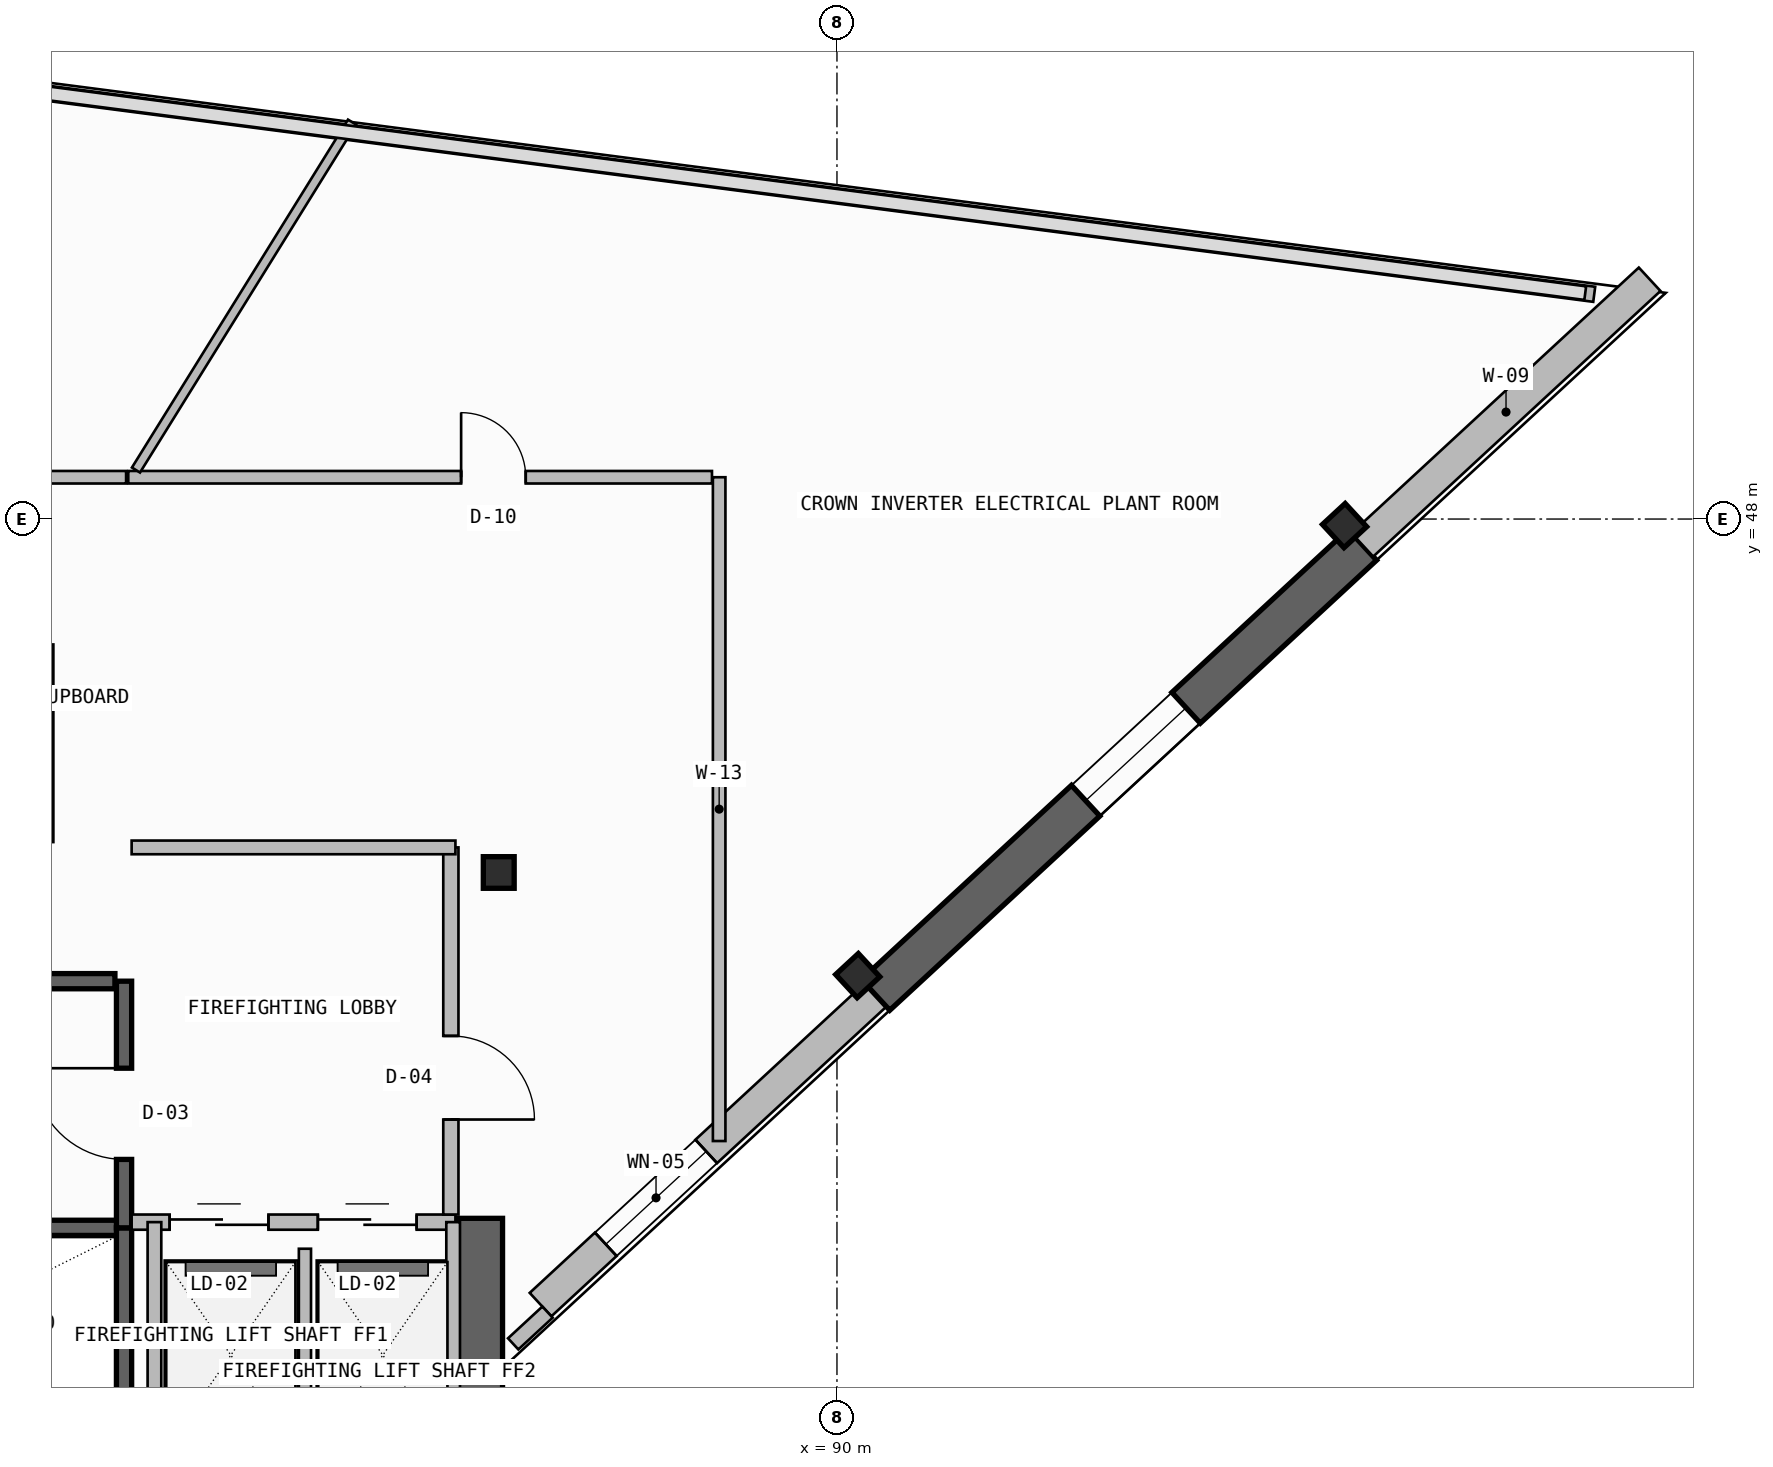
"""IFC4 building model, lengths in metres.
Left out: names, types, materials, properties, quantities, classifications, styles, units other than length and angle.
Written with IfcOpenShell. Run it as: python <this file> out.ifc"""

import sys

from ifc_helpers import new_model, si_unit, direction, frame, frame_2d, origin, origin_2d, place, context, subcontext, project, spatial, polyline, rectangle, i_section, outline, extrude, element, fill, save


model = new_model("IFC4")
c1 = context("Model", 3, precision=1e-05, world=origin(), true_north=direction((0.0, 1.0)))
c2 = subcontext(c1, "Body", "Model", "MODEL_VIEW")
j1 = project(units=[si_unit("LENGTHUNIT", "METRE"), si_unit("PLANEANGLEUNIT", "RADIAN")], contexts=[c1])
p1 = place(None, origin())
s1 = spatial("IfcSite", under=j1, at=p1, CompositionType="ELEMENT")
p2 = place(p1, origin())
s2 = spatial("IfcBuilding", under=s1, at=p2, CompositionType="ELEMENT")
p3 = place(p2, frame((0.0, 0.0, 312.58)))
s3 = spatial("IfcBuildingStorey", under=s2, at=p3, CompositionType="ELEMENT", Elevation=312.58)
p4 = place(p3, frame((85.3, 35.5, -0.2), z_axis=(0.0, 0.0, 1.0), x_axis=(0.0, 1.0, 0.0)))
e1 = element("IfcWall", 1, at=p4, inside=s3, PredefinedType="SHEAR", context=c2, shape_type="SweptSolid", body=[
    extrude(rectangle(XDim=3.3, YDim=0.6, at=frame_2d((1.65, 0.0))), origin(), (0.0, 0.0, 1.0), 4.8),
])
for number, where, z_axis, x_axis in (
    (2, (85.55, 43.35, 0.0), (0.0, 0.0, 1.0), (1.0, 0.0, 0.0)),
    (3, (90.273, 41.993, 0.0), (0.0, 0.0, 1.0), (0.734, 0.679, 0.0)),
):
    element("IfcColumn", number, at=place(p3, frame(where, z_axis=z_axis, x_axis=x_axis)), inside=s3, PredefinedType="COLUMN", context=c2, shape_type="SweptSolid", body=[
        extrude(i_section(OverallWidth=0.406, OverallDepth=0.416, WebThickness=0.03, FlangeThickness=0.048, FilletRadius=0.015, at=origin_2d()), origin(), (0.0, 0.0, 1.0), 4.8),
    ])
p5 = place(p3, frame((96.679, 47.914, 0.0), z_axis=(0.0, 0.0, 1.0), x_axis=(0.734322509436, 0.678800745533, 0.0)))
e4 = element("IfcColumn", 4, at=p5, inside=s3, PredefinedType="COLUMN", context=c2, shape_type="SweptSolid", body=[
    extrude(i_section(OverallWidth=0.406, OverallDepth=0.416, WebThickness=0.03, FlangeThickness=0.048, FilletRadius=0.015, at=origin_2d()), origin(), (0.0, 0.0, 1.0), 3.756),
])
p6 = place(p3, frame((86.1, 37.665, 0.0), z_axis=(0.0, 0.0, 1.0), x_axis=(0.734321413343, 0.678801931277, 0.0)))
e5 = element("IfcWall", 5, at=p6, inside=s3, PredefinedType="SOLIDWALL", context=c2, shape_type="SweptSolid", body=[
    extrude(outline(polyline([(0.0, 0.0), (6.002, 0.0), (6.002, 4.6), (0.0, 4.6), (0.0, 0.0)])), frame((0.0, 0.21, 0.0), z_axis=(0.0, -1.0, 0.0), x_axis=(1.0, 0.0, 0.0)), (0.0, 0.0, 1.0), 0.42),
])
p7 = place(p6, frame((1.169, 0.0, 0.7)))
e6 = element("IfcOpeningElement", 6, at=p7, cuts=e5, PredefinedType="OPENING", context=c2, shape_type="SweptSolid", body=[
    extrude(rectangle(XDim=1.8, YDim=1.2, at=frame_2d((0.9, 0.6))), frame((0.0, 0.22, 0.0), z_axis=(0.0, -1.0, 0.0), x_axis=(1.0, 0.0, 0.0)), (0.0, 0.0, 1.0), 0.44),
])
p8 = place(p3, frame((90.508, 41.74, -0.2), z_axis=(0.0, 0.0, 1.0), x_axis=(0.734313922731, 0.67881003446, 0.0)))
e7 = element("IfcWall", 7, at=p8, inside=s3, PredefinedType="SHEAR", context=c2, shape_type="SweptSolid", body=[
    extrude(outline(polyline([(0.0, 0.0), (8.722, 0.0), (8.723, 4.055), (0.0, 4.8), (0.0, 0.0)])), frame((0.0, 0.275, 0.0), z_axis=(0.0, -1.0, 0.0), x_axis=(1.0, 0.0, 0.0)), (0.0, 0.0, 1.0), 0.55),
])
p9 = place(p8, frame((3.764, 0.0, 0.7)))
e8 = element("IfcOpeningElement", 8, at=p9, cuts=e7, PredefinedType="OPENING", context=c2, shape_type="SweptSolid", body=[
    extrude(rectangle(XDim=1.8, YDim=1.2, at=frame_2d((0.9, 0.6))), frame((0.0, 0.285, 0.0), z_axis=(0.0, -1.0, 0.0), x_axis=(1.0, 0.0, 0.0)), (0.0, 0.0, 1.0), 0.57),
])
p10 = place(p3, frame((96.913, 47.66, 0.0), z_axis=(0.0, 0.0, 1.0), x_axis=(0.734332287734, 0.678790167276, 0.0)))
e9 = element("IfcWall", 9, at=p10, inside=s3, PredefinedType="SOLIDWALL", context=c2, shape_type="SweptSolid", body=[
    extrude(outline(polyline([(0.0, 0.0), (5.147, 0.0), (5.147, 2.095), (0.0, 3.854), (0.0, 0.0)])), frame((0.0, 0.21, 0.0), z_axis=(0.0, -1.0, 0.0), x_axis=(1.0, 0.0, 0.0)), (0.0, 0.0, 1.0), 0.42),
])
p11 = place(p3, frame((52.18, 57.167, 0.0), z_axis=(0.0, 0.0, 1.0), x_axis=(0.991658680797, -0.128891663035, 0.0)))
e10 = element("IfcWall", 10, at=p11, inside=s3, PredefinedType="PARAPET", context=c2, shape_type="SweptSolid", body=[
    extrude(rectangle(XDim=48.185, YDim=0.2, at=frame_2d((24.093, 0.0))), origin(), (0.0, 0.0, 1.0), 1.15),
])
p12 = place(p3, frame((86.192, 37.566, 0.0), z_axis=(0.0, 0.0, 1.0), x_axis=(-0.734346728958, -0.678774544064, 0.0)))
e11 = element("IfcWall", 11, at=p12, inside=s3, PredefinedType="PARAPET", context=c2, shape_type="SweptSolid", body=[
    extrude(rectangle(XDim=0.615, YDim=0.2, at=frame_2d((0.308, 0.0))), origin(), (0.0, 0.0, 1.0), 1.15),
])
p13 = place(p3, frame((72.92, 38.675, -0.2), z_axis=(0.0, 0.0, 1.0), x_axis=(1.0, 0.0, 0.0)))
e12 = element("IfcWall", 12, at=p13, inside=s3, PredefinedType="SOLIDWALL", context=c2, shape_type="SweptSolid", body=[
    extrude(rectangle(XDim=7.7, YDim=0.2, at=frame_2d((3.85, 0.0))), origin(), (0.0, 0.0, 1.0), 4.8),
])
p14 = place(p3, frame((80.62, 35.52, -0.2), z_axis=(0.0, 0.0, 1.0), x_axis=(0.0, 1.0, 0.0)))
e13 = element("IfcWall", 13, at=p14, inside=s3, PredefinedType="SOLIDWALL", context=c2, shape_type="SweptSolid", body=[
    extrude(rectangle(XDim=3.155, YDim=0.2, at=frame_2d((1.578, 0.0))), origin(), (0.0, 0.0, 1.0), 4.8),
])
p15 = place(p3, frame((80.62, 38.675, -0.2), z_axis=(0.0, 0.0, 1.0), x_axis=(0.0, 1.0, 0.0)))
e14 = element("IfcWall", 14, at=p15, inside=s3, PredefinedType="SOLIDWALL", context=c2, shape_type="SweptSolid", body=[
    extrude(rectangle(XDim=3.245, YDim=0.2, at=frame_2d((1.623, 0.0))), origin(), (0.0, 0.0, 1.0), 4.8),
])
p16 = place(p15, frame((0.9, 0.0, 0.2)))
e15 = element("IfcOpeningElement", 15, at=p16, cuts=e14, PredefinedType="OPENING", context=c2, shape_type="SweptSolid", body=[
    extrude(rectangle(XDim=1.2, YDim=2.2, at=frame_2d((0.6, 1.1))), frame((0.0, 0.11, 0.0), z_axis=(0.0, -1.0, 0.0), x_axis=(1.0, 0.0, 0.0)), (0.0, 0.0, 1.0), 0.22),
])
p17 = place(p3, frame((80.72, 38.75, 0.0), z_axis=(0.0, 0.0, 1.0), x_axis=(1.0, 0.0, 0.0)))
e16 = element("IfcWall", 16, at=p17, inside=s3, PredefinedType="SOLIDWALL", context=c2, shape_type="SweptSolid", body=[
    extrude(rectangle(XDim=4.26, YDim=0.2, at=frame_2d((2.13, 0.0))), origin(), (0.0, 0.0, 1.0), 4.6),
])
p18 = place(p17, frame((0.5, 0.0, 0.0)))
e17 = element("IfcOpeningElement", 17, at=p18, cuts=e16, PredefinedType="OPENING", context=c2, shape_type="SweptSolid", body=[
    extrude(rectangle(XDim=1.3, YDim=2.3, at=frame_2d((0.65, 1.15))), frame((0.0, 0.11, 0.0), z_axis=(0.0, -1.0, 0.0), x_axis=(1.0, 0.0, 0.0)), (0.0, 0.0, 1.0), 0.22),
])
p19 = place(p17, frame((2.45, 0.0, 0.0)))
e18 = element("IfcOpeningElement", 18, at=p19, cuts=e16, PredefinedType="OPENING", context=c2, shape_type="SweptSolid", body=[
    extrude(rectangle(XDim=1.3, YDim=2.3, at=frame_2d((0.65, 1.15))), frame((0.0, 0.11, 0.0), z_axis=(0.0, -1.0, 0.0), x_axis=(1.0, 0.0, 0.0)), (0.0, 0.0, 1.0), 0.22),
])
p20 = place(p3, frame((83.0, 35.65, 0.0), z_axis=(0.0, 0.0, 1.0), x_axis=(0.0, 1.0, 0.0)))
e19 = element("IfcWall", 19, at=p20, inside=s3, PredefinedType="PLUMBINGWALL", context=c2, shape_type="SweptSolid", body=[
    extrude(rectangle(XDim=2.75, YDim=0.16, at=frame_2d((1.375, 0.0))), origin(), (0.0, 0.0, 1.0), 4.6),
])
for number, where, z_axis, x_axis in (
    (20, (84.95, 35.65, 0.0), (0.0, 0.0, 1.0), (0.0, 1.0, 0.0)),
    (21, (81.02, 35.65, 0.0), (0.0, 0.0, 1.0), (0.0, 1.0, 0.0)),
):
    element("IfcWall", number, at=place(p3, frame(where, z_axis=z_axis, x_axis=x_axis)), inside=s3, PredefinedType="SOLIDWALL", context=c2, shape_type="SweptSolid", body=[
        extrude(rectangle(XDim=3.1, YDim=0.18, at=frame_2d((1.55, 0.0))), origin(), (0.0, 0.0, 1.0), 4.6),
    ])
p21 = place(p3, frame((84.92, 38.85, 0.0), z_axis=(0.0, 0.0, 1.0), x_axis=(0.0, 1.0, 0.0)))
e22 = element("IfcWall", 22, at=p21, inside=s3, PredefinedType="SOLIDWALL", context=c2, shape_type="SweptSolid", body=[
    extrude(rectangle(XDim=4.83, YDim=0.2, at=frame_2d((2.415, 0.0))), origin(), (0.0, 0.0, 1.0), 4.6),
])
p22 = place(p21, frame((1.25, 0.0, 0.0)))
e23 = element("IfcOpeningElement", 23, at=p22, cuts=e22, PredefinedType="OPENING", context=c2, shape_type="SweptSolid", body=[
    extrude(rectangle(XDim=1.1, YDim=2.2, at=frame_2d((0.55, 1.1))), frame((0.0, 0.11, 0.0), z_axis=(0.0, -1.0, 0.0), x_axis=(1.0, 0.0, 0.0)), (0.0, 0.0, 1.0), 0.22),
])
p23 = place(p3, frame((72.92, 41.92, -0.2), z_axis=(0.0, 0.0, 1.0), x_axis=(1.0, 0.0, 0.0)))
e24 = element("IfcWall", 24, at=p23, inside=s3, PredefinedType="SOLIDWALL", context=c2, shape_type="SweptSolid", body=[
    extrude(rectangle(XDim=7.58, YDim=0.2, at=frame_2d((3.79, 0.0))), origin(), (0.0, 0.0, 1.0), 4.8),
])
p24 = place(p3, frame((80.72, 43.68, 0.0), z_axis=(0.0, 0.0, 1.0), x_axis=(1.0, 0.0, 0.0)))
e25 = element("IfcWall", 25, at=p24, inside=s3, PredefinedType="SOLIDWALL", context=c2, shape_type="SweptSolid", body=[
    extrude(rectangle(XDim=4.26, YDim=0.18, at=frame_2d((2.13, 0.0))), origin(), (0.0, 0.0, 1.0), 4.6),
])
p25 = place(p3, frame((79.6, 43.75, 0.0), z_axis=(0.0, 0.0, 1.0), x_axis=(0.0, 1.0, 0.0)))
e26 = element("IfcWall", 26, at=p25, inside=s3, PredefinedType="PLUMBINGWALL", context=c2, shape_type="SweptSolid", body=[
    extrude(rectangle(XDim=2.6, YDim=0.18, at=frame_2d((1.3, 0.0))), origin(), (0.0, 0.0, 1.0), 4.6),
])
p26 = place(p3, frame((88.45, 39.817, 0.0), z_axis=(0.0, 0.0, 1.0), x_axis=(0.0, 1.0, 0.0)))
e27 = element("IfcWall", 27, at=p26, inside=s3, PredefinedType="PARTITIONING", context=c2, shape_type="SweptSolid", body=[
    extrude(rectangle(XDim=8.733, YDim=0.165, at=frame_2d((4.367, 0.0))), origin(), (0.0, 0.0, 1.0), 2.12),
])
p27 = place(p3, frame((88.355, 48.55, 0.0), z_axis=(0.0, 0.0, 1.0), x_axis=(-1.0, 0.0, 0.0)))
e28 = element("IfcWall", 28, at=p27, inside=s3, PredefinedType="PARTITIONING", context=c2, shape_type="SweptSolid", body=[
    extrude(rectangle(XDim=7.68, YDim=0.165, at=frame_2d((3.84, 0.0))), origin(), (0.0, 0.0, 1.0), 2.12),
])
p28 = place(p27, frame((2.45, 0.0, 0.0)))
e29 = element("IfcOpeningElement", 29, at=p28, cuts=e28, PredefinedType="OPENING", context=c2, shape_type="SweptSolid", body=[
    extrude(rectangle(XDim=0.85, YDim=2.05, at=frame_2d((0.425, 1.025))), frame((0.0, 0.093, 0.0), z_axis=(0.0, -1.0, 0.0), x_axis=(1.0, 0.0, 0.0)), (0.0, 0.0, 1.0), 0.185),
])
p29 = place(p3, frame((80.777, 48.645, 0.0), z_axis=(0.0, 0.0, 1.0), x_axis=(0.527561345101, 0.849516937533, 0.0)))
e30 = element("IfcWall", 30, at=p29, inside=s3, PredefinedType="PARTITIONING", context=c2, shape_type="SweptSolid", body=[
    extrude(rectangle(XDim=5.388, YDim=0.125, at=frame_2d((2.694, 0.0))), origin(), (0.0, 0.0, 1.0), 2.12),
])
p30 = place(p3, frame((80.647, 48.55, 0.0), z_axis=(0.0, 0.0, 1.0), x_axis=(-1.0, 0.0, 0.0)))
e31 = element("IfcWall", 31, at=p30, inside=s3, PredefinedType="PARTITIONING", context=c2, shape_type="SweptSolid", body=[
    extrude(rectangle(XDim=11.347, YDim=0.165, at=frame_2d((5.674, 0.0))), origin(), (0.0, 0.0, 1.0), 2.12),
])
p31 = place(p30, frame((9.085, 0.0, 0.0)))
e32 = element("IfcOpeningElement", 32, at=p31, cuts=e31, PredefinedType="OPENING", context=c2, shape_type="SweptSolid", body=[
    extrude(rectangle(XDim=0.85, YDim=2.05, at=frame_2d((0.425, 1.025))), frame((0.0, 0.093, 0.0), z_axis=(0.0, -1.0, 0.0), x_axis=(1.0, 0.0, 0.0)), (0.0, 0.0, 1.0), 0.185),
])
p32 = place(p7, origin())
e33 = element("IfcWindow", 33, at=p32, inside=s3, PartitioningType="SINGLE_PANEL", PredefinedType="WINDOW", context=c2, shape_type="SweptSolid", body=[
    extrude(rectangle(XDim=1.8, YDim=1.2, at=frame_2d((0.9, 0.6))), frame((0.0, 0.03, 0.0), z_axis=(0.0, -1.0, 0.0), x_axis=(1.0, 0.0, 0.0)), (0.0, 0.0, 1.0), 0.06),
])
fill(e6, e33)
p33 = place(p9, origin())
e34 = element("IfcWindow", 34, at=p33, inside=s3, PartitioningType="SINGLE_PANEL", PredefinedType="WINDOW", context=c2, shape_type="SweptSolid", body=[
    extrude(rectangle(XDim=1.8, YDim=1.2, at=frame_2d((0.9, 0.6))), frame((0.0, 0.03, 0.0), z_axis=(0.0, -1.0, 0.0), x_axis=(1.0, 0.0, 0.0)), (0.0, 0.0, 1.0), 0.06),
])
fill(e8, e34)
p34 = place(p16, origin())
e35 = element("IfcDoor", 35, at=p34, inside=s3, OperationType="SINGLE_SWING_RIGHT", PredefinedType="USERDEFINED", context=c2, shape_type="SweptSolid", body=[
    extrude(rectangle(XDim=1.2, YDim=2.2, at=frame_2d((0.6, 1.1))), frame((0.0, 0.025, 0.0), z_axis=(0.0, -1.0, 0.0), x_axis=(1.0, 0.0, 0.0)), (0.0, 0.0, 1.0), 0.05),
])
fill(e15, e35)
p35 = place(p18, origin())
e36 = element("IfcDoor", 36, at=p35, inside=s3, OperationType="DOUBLE_DOOR_SLIDING", PredefinedType="DOOR", context=c2, shape_type="SweptSolid", body=[
    extrude(rectangle(XDim=1.3, YDim=2.3, at=frame_2d((0.65, 1.15))), frame((0.0, 0.025, 0.0), z_axis=(0.0, -1.0, 0.0), x_axis=(1.0, 0.0, 0.0)), (0.0, 0.0, 1.0), 0.05),
])
fill(e17, e36)
p36 = place(p19, origin())
e37 = element("IfcDoor", 37, at=p36, inside=s3, OperationType="DOUBLE_DOOR_SLIDING", PredefinedType="DOOR", context=c2, shape_type="SweptSolid", body=[
    extrude(rectangle(XDim=1.3, YDim=2.3, at=frame_2d((0.65, 1.15))), frame((0.0, 0.025, 0.0), z_axis=(0.0, -1.0, 0.0), x_axis=(1.0, 0.0, 0.0)), (0.0, 0.0, 1.0), 0.05),
])
fill(e18, e37)
p37 = place(p22, frame((1.1, 0.0, 0.0), z_axis=(0.0, 0.0, 1.0), x_axis=(-1.0, 0.0, 0.0)))
e38 = element("IfcDoor", 38, at=p37, inside=s3, OperationType="SINGLE_SWING_RIGHT", PredefinedType="DOOR", context=c2, shape_type="SweptSolid", body=[
    extrude(rectangle(XDim=1.1, YDim=2.2, at=frame_2d((0.55, 1.1))), frame((0.0, 0.025, 0.0), z_axis=(0.0, -1.0, 0.0), x_axis=(1.0, 0.0, 0.0)), (0.0, 0.0, 1.0), 0.05),
])
fill(e23, e38)
p38 = place(p28, frame((0.85, 0.0, 0.0), z_axis=(0.0, 0.0, 1.0), x_axis=(-1.0, 0.0, 0.0)))
e39 = element("IfcDoor", 39, at=p38, inside=s3, OperationType="SINGLE_SWING_LEFT", PredefinedType="DOOR", context=c2, shape_type="SweptSolid", body=[
    extrude(rectangle(XDim=0.85, YDim=2.05, at=frame_2d((0.425, 1.025))), frame((0.0, 0.025, 0.0), z_axis=(0.0, -1.0, 0.0), x_axis=(1.0, 0.0, 0.0)), (0.0, 0.0, 1.0), 0.05),
])
fill(e29, e39)
save(model, sys.argv[1])
